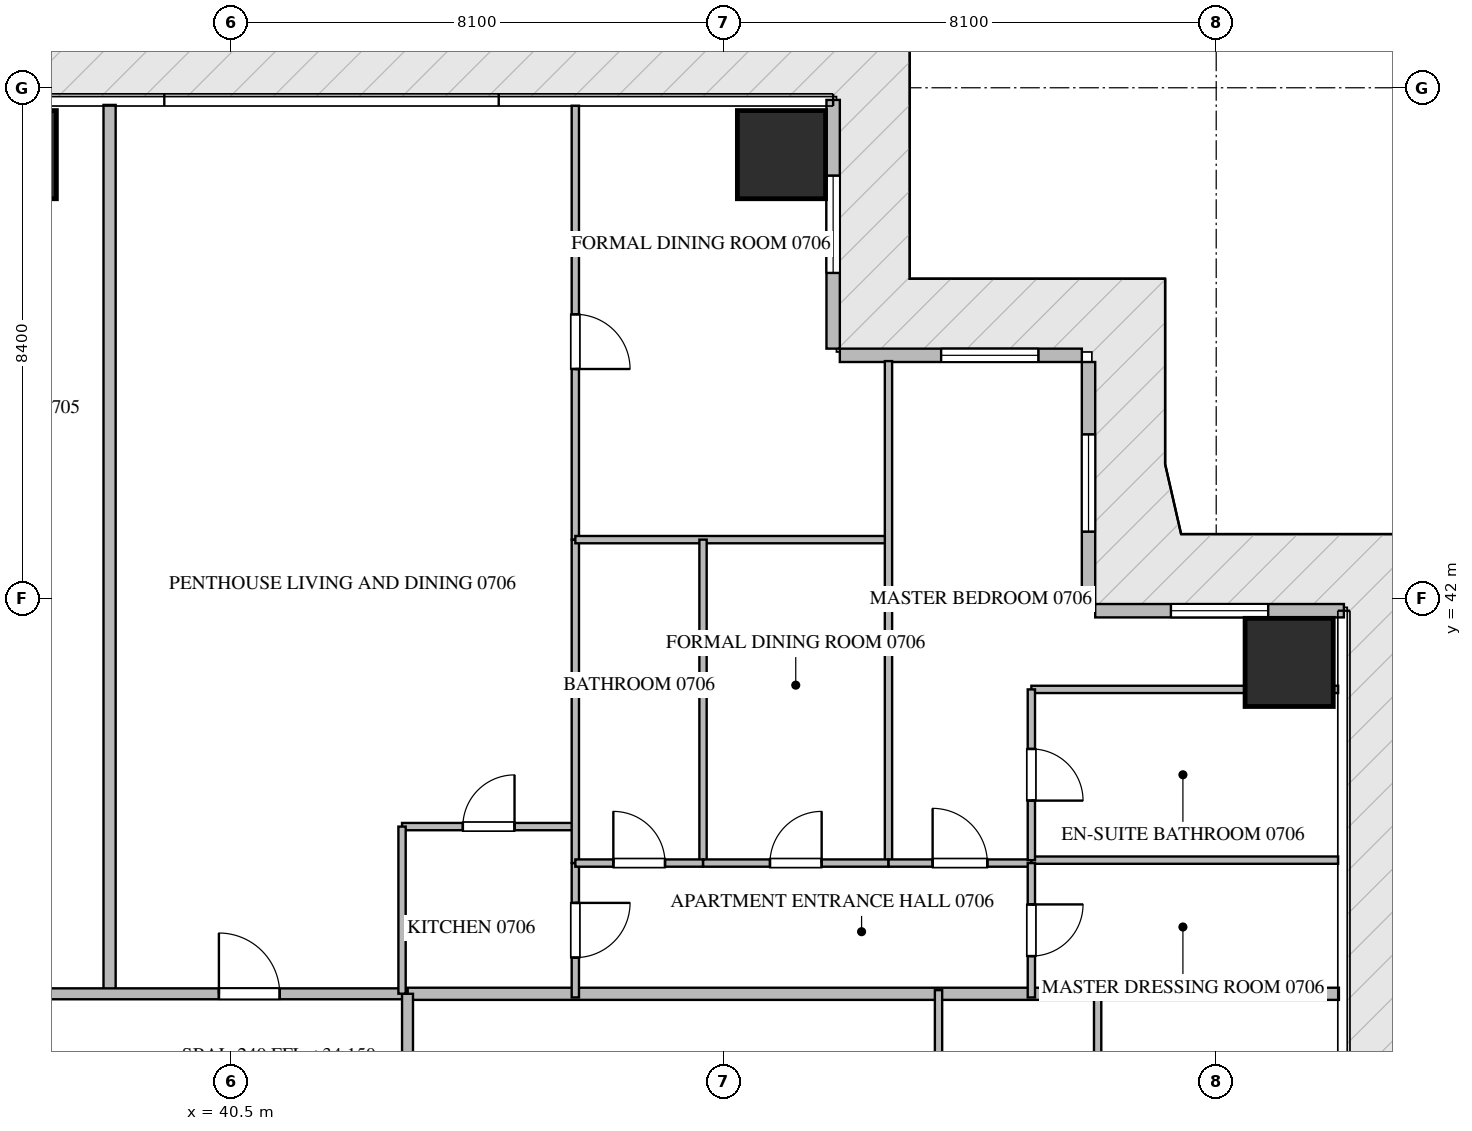
"""IFC4 building model, lengths in metres.
Left out: names, types, materials, properties, quantities, classifications, styles, units other than length and angle.
Written with IfcOpenShell. Run it as: python <this file> out.ifc"""

import sys

from ifc_helpers import new_model, si_unit, direction, frame, frame_2d, origin, origin_2d, place, context, subcontext, project, spatial, rectangle, extrude, source, transform, mapped, element, fill, save


model = new_model("IFC4")
c1 = context("Model", 3, precision=1e-05, world=origin(), true_north=direction((0.0, 1.0)))
c2 = subcontext(c1, "Body", "Model", "MODEL_VIEW")
j1 = project(units=[si_unit("LENGTHUNIT", "METRE"), si_unit("PLANEANGLEUNIT", "RADIAN")], contexts=[c1])
p1 = place(None, origin())
s1 = spatial("IfcSite", under=j1, at=p1, CompositionType="ELEMENT")
p2 = place(p1, origin())
s2 = spatial("IfcBuilding", under=s1, at=p2, CompositionType="ELEMENT")
p3 = place(p2, frame((0.0, 0.0, 34.2)))
s3 = spatial("IfcBuildingStorey", under=s2, at=p3, CompositionType="ELEMENT", Elevation=34.2)
m1 = source(origin(), c2, "Body", "SweptSolid", [
    extrude(rectangle(XDim=1.45, YDim=1.45, at=origin_2d()), origin(), (0.0, 0.0, 1.0), 3.75),
])
for number, where, z_axis, x_axis in (
    (1, (36.9, 49.3, -0.26), (0.0, 0.0, 1.0), (1.0, 0.0, 0.0)),
    (2, (49.55, 49.3, -0.26), (0.0, 0.0, 1.0), (1.0, 0.0, 0.0)),
    (3, (57.9, 40.95, -0.26), (0.0, 0.0, 1.0), (1.0, 0.0, 0.0)),
):
    element("IfcColumn", number, at=place(p3, frame(where, z_axis=z_axis, x_axis=x_axis)), inside=s3, PredefinedType="COLUMN", context=c2, shape_type="MappedRepresentation", body=[
        mapped(m1, transform((0.0, 0.0, 0.0), scale=1.0)),
    ])
p4 = place(p3, frame((58.8, 41.8, 0.0), z_axis=(0.0, 0.0, 1.0), x_axis=(-1.0, 0.0, 0.0)))
e4 = element("IfcWall", 4, at=p4, inside=s3, PredefinedType="ELEMENTEDWALL", context=c2, shape_type="SweptSolid", body=[
    extrude(rectangle(XDim=4.09, YDim=0.22, at=frame_2d((2.045, 0.0))), origin(), (0.0, 0.0, 1.0), 3.475),
])
p5 = place(p4, frame((1.245, 0.0, 0.65)))
e5 = element("IfcOpeningElement", 5, at=p5, cuts=e4, PredefinedType="OPENING", context=c2, shape_type="SweptSolid", body=[
    extrude(rectangle(XDim=1.6, YDim=2.1, at=frame_2d((0.8, 1.05))), frame((0.0, 0.12, 0.0), z_axis=(0.0, -1.0, 0.0), x_axis=(1.0, 0.0, 0.0)), (0.0, 0.0, 1.0), 0.24),
])
p6 = place(p3, frame((54.6, 41.91, 0.0), z_axis=(0.0, 0.0, 1.0), x_axis=(0.0, 1.0, 0.0)))
e6 = element("IfcWall", 6, at=p6, inside=s3, PredefinedType="ELEMENTEDWALL", context=c2, shape_type="SweptSolid", body=[
    extrude(rectangle(XDim=3.98, YDim=0.22, at=frame_2d((1.99, 0.0))), origin(), (0.0, 0.0, 1.0), 3.475),
])
p7 = place(p6, frame((1.19, 0.0, 0.65)))
e7 = element("IfcOpeningElement", 7, at=p7, cuts=e6, PredefinedType="OPENING", context=c2, shape_type="SweptSolid", body=[
    extrude(rectangle(XDim=1.6, YDim=2.1, at=frame_2d((0.8, 1.05))), frame((0.0, 0.12, 0.0), z_axis=(0.0, -1.0, 0.0), x_axis=(1.0, 0.0, 0.0)), (0.0, 0.0, 1.0), 0.24),
])
p8 = place(p3, frame((54.49, 46.0, 0.0), z_axis=(0.0, 0.0, 1.0), x_axis=(-1.0, 0.0, 0.0)))
e8 = element("IfcWall", 8, at=p8, inside=s3, PredefinedType="ELEMENTEDWALL", context=c2, shape_type="SweptSolid", body=[
    extrude(rectangle(XDim=3.98, YDim=0.22, at=frame_2d((1.99, 0.0))), origin(), (0.0, 0.0, 1.0), 3.475),
])
p9 = place(p8, frame((0.714, 0.0, 0.65)))
e9 = element("IfcOpeningElement", 9, at=p9, cuts=e8, PredefinedType="OPENING", context=c2, shape_type="SweptSolid", body=[
    extrude(rectangle(XDim=1.6, YDim=2.1, at=frame_2d((0.8, 1.05))), frame((0.0, 0.12, 0.0), z_axis=(0.0, -1.0, 0.0), x_axis=(1.0, 0.0, 0.0)), (0.0, 0.0, 1.0), 0.24),
])
p10 = place(p3, frame((50.4, 46.11, 0.0), z_axis=(0.0, 0.0, 1.0), x_axis=(0.0, 1.0, 0.0)))
e10 = element("IfcWall", 10, at=p10, inside=s3, PredefinedType="ELEMENTEDWALL", context=c2, shape_type="SweptSolid", body=[
    extrude(rectangle(XDim=4.09, YDim=0.22, at=frame_2d((2.045, 0.0))), origin(), (0.0, 0.0, 1.0), 3.475),
])
p11 = place(p10, frame((1.245, 0.0, 0.65)))
e11 = element("IfcOpeningElement", 11, at=p11, cuts=e10, PredefinedType="OPENING", context=c2, shape_type="SweptSolid", body=[
    extrude(rectangle(XDim=1.6, YDim=2.1, at=frame_2d((0.8, 1.05))), frame((0.0, 0.12, 0.0), z_axis=(0.0, -1.0, 0.0), x_axis=(1.0, 0.0, 0.0)), (0.0, 0.0, 1.0), 0.24),
])
p12 = place(p3, frame((38.5, 35.5, 0.0), z_axis=(0.0, 0.0, 1.0), x_axis=(0.0, 1.0, 0.0)))
e12 = element("IfcWall", 12, at=p12, inside=s3, PredefinedType="PARTITIONING", context=c2, shape_type="SweptSolid", body=[
    extrude(rectangle(XDim=14.618, YDim=0.2, at=frame_2d((7.309, 0.0))), origin(), (0.0, 0.0, 1.0), 3.49),
])
p13 = place(p3, frame((43.4, 35.5, 0.0), z_axis=(0.0, 0.0, 1.0), x_axis=(1.0, 0.0, 0.0)))
e13 = element("IfcWall", 13, at=p13, inside=s3, PredefinedType="PARTITIONING", context=c2, shape_type="SweptSolid", body=[
    extrude(rectangle(XDim=15.318, YDim=0.2, at=frame_2d((7.659, 0.0))), origin(), (0.0, 0.0, 1.0), 3.49),
])
p14 = place(p3, frame((21.402, 35.5, 0.0), z_axis=(0.0, 0.0, 1.0), x_axis=(1.0, 0.0, 0.0)))
e14 = element("IfcWall", 14, at=p14, inside=s3, PredefinedType="PARTITIONING", context=c2, shape_type="SweptSolid", body=[
    extrude(rectangle(XDim=21.996, YDim=0.18, at=frame_2d((10.998, 0.0))), origin(), (0.0, 0.0, 1.0), 3.49),
])
p15 = place(p14, frame((2.1, 0.0, 0.0)))
e15 = element("IfcOpeningElement", 15, at=p15, cuts=e14, PredefinedType="OPENING", context=c2, shape_type="SweptSolid", body=[
    extrude(rectangle(XDim=1.0, YDim=2.15, at=frame_2d((0.5, 1.075))), frame((0.0, 0.1, 0.0), z_axis=(0.0, -1.0, 0.0), x_axis=(1.0, 0.0, 0.0)), (0.0, 0.0, 1.0), 0.2),
])
p16 = place(p14, frame((14.277, 0.0, 0.0)))
e16 = element("IfcOpeningElement", 16, at=p16, cuts=e14, PredefinedType="OPENING", context=c2, shape_type="SweptSolid", body=[
    extrude(rectangle(XDim=1.0, YDim=2.15, at=frame_2d((0.5, 1.075))), frame((0.0, 0.1, 0.0), z_axis=(0.0, -1.0, 0.0), x_axis=(1.0, 0.0, 0.0)), (0.0, 0.0, 1.0), 0.2),
])
p17 = place(p14, frame((18.896, 0.0, 0.0)))
e17 = element("IfcOpeningElement", 17, at=p17, cuts=e14, PredefinedType="OPENING", context=c2, shape_type="SweptSolid", body=[
    extrude(rectangle(XDim=1.0, YDim=2.15, at=frame_2d((0.5, 1.075))), frame((0.0, 0.1, 0.0), z_axis=(0.0, -1.0, 0.0), x_axis=(1.0, 0.0, 0.0)), (0.0, 0.0, 1.0), 0.2),
])
p18 = place(p3, frame((43.4, 14.9, 0.0), z_axis=(0.0, 0.0, 1.0), x_axis=(0.0, 1.0, 0.0)))
e18 = element("IfcWall", 18, at=p18, inside=s3, PredefinedType="PARTITIONING", context=c2, shape_type="SweptSolid", body=[
    extrude(rectangle(XDim=20.6, YDim=0.18, at=frame_2d((10.3, 0.0))), origin(), (0.0, 0.0, 1.0), 3.49),
])
p19 = place(p18, frame((1.96, 0.0, 0.0)))
e19 = element("IfcOpeningElement", 19, at=p19, cuts=e18, PredefinedType="OPENING", context=c2, shape_type="SweptSolid", body=[
    extrude(rectangle(XDim=1.0, YDim=2.15, at=frame_2d((0.5, 1.075))), frame((0.0, 0.1, 0.0), z_axis=(0.0, -1.0, 0.0), x_axis=(1.0, 0.0, 0.0)), (0.0, 0.0, 1.0), 0.2),
])
p20 = place(p3, frame((43.31, 38.25, 0.0), z_axis=(0.0, 0.0, 1.0), x_axis=(1.0, 0.0, 0.0)))
e20 = element("IfcWall", 20, at=p20, inside=s3, PredefinedType="PARTITIONING", context=c2, shape_type="SweptSolid", body=[
    extrude(rectangle(XDim=2.85, YDim=0.12, at=frame_2d((1.425, 0.0))), origin(), (0.0, 0.0, 1.0), 3.49),
])
p21 = place(p20, frame((1.0, 0.0, 0.0)))
e21 = element("IfcOpeningElement", 21, at=p21, cuts=e20, PredefinedType="OPENING", context=c2, shape_type="SweptSolid", body=[
    extrude(rectangle(XDim=0.85, YDim=2.1, at=frame_2d((0.425, 1.05))), frame((0.0, 0.07, 0.0), z_axis=(0.0, -1.0, 0.0), x_axis=(1.0, 0.0, 0.0)), (0.0, 0.0, 1.0), 0.14),
])
p22 = place(p3, frame((43.31, 38.25, 0.0), z_axis=(0.0, 0.0, 1.0), x_axis=(0.0, -1.0, 0.0)))
e22 = element("IfcWall", 22, at=p22, inside=s3, PredefinedType="PARTITIONING", context=c2, shape_type="SweptSolid", body=[
    extrude(rectangle(XDim=2.748, YDim=0.12, at=frame_2d((1.374, 0.0))), origin(), (0.0, 0.0, 1.0), 3.49),
])
p23 = place(p3, frame((46.16, 37.65, 0.0), z_axis=(0.0, 0.0, 1.0), x_axis=(0.0, -1.0, 0.0)))
e23 = element("IfcWall", 23, at=p23, inside=s3, PredefinedType="PARTITIONING", context=c2, shape_type="SweptSolid", body=[
    extrude(rectangle(XDim=2.21, YDim=0.12, at=frame_2d((1.105, 0.0))), origin(), (0.0, 0.0, 1.0), 3.49),
])
p24 = place(p23, frame((0.655, 0.0, 0.0)))
e24 = element("IfcOpeningElement", 24, at=p24, cuts=e23, PredefinedType="OPENING", context=c2, shape_type="SweptSolid", body=[
    extrude(rectangle(XDim=0.9, YDim=2.1, at=frame_2d((0.45, 1.05))), frame((0.0, 0.07, 0.0), z_axis=(0.0, -1.0, 0.0), x_axis=(1.0, 0.0, 0.0)), (0.0, 0.0, 1.0), 0.14),
])
p25 = place(p3, frame((46.16, 50.105, 0.0), z_axis=(0.0, 0.0, 1.0), x_axis=(0.0, -1.0, 0.0)))
e25 = element("IfcWall", 25, at=p25, inside=s3, PredefinedType="PARTITIONING", context=c2, shape_type="SweptSolid", body=[
    extrude(rectangle(XDim=7.136, YDim=0.12, at=frame_2d((3.568, 0.0))), origin(), (0.0, 0.0, 1.0), 3.49),
])
p26 = place(p25, frame((3.43, 0.0, 0.0)))
e26 = element("IfcOpeningElement", 26, at=p26, cuts=e25, PredefinedType="OPENING", context=c2, shape_type="SweptSolid", body=[
    extrude(rectangle(XDim=0.9, YDim=2.1, at=frame_2d((0.45, 1.05))), frame((0.0, 0.07, 0.0), z_axis=(0.0, -1.0, 0.0), x_axis=(1.0, 0.0, 0.0)), (0.0, 0.0, 1.0), 0.14),
])
p27 = place(p3, frame((46.16, 42.967, 0.0), z_axis=(0.0, 0.0, 1.0), x_axis=(0.0, -1.0, 0.0)))
e27 = element("IfcWall", 27, at=p27, inside=s3, PredefinedType="PARTITIONING", context=c2, shape_type="SweptSolid", body=[
    extrude(rectangle(XDim=5.315, YDim=0.12, at=frame_2d((2.657, 0.0))), origin(), (0.0, 0.0, 1.0), 3.49),
])
p28 = place(p3, frame((46.16, 42.969, 0.0), z_axis=(0.0, 0.0, 1.0), x_axis=(1.0, 0.0, 0.0)))
e28 = element("IfcWall", 28, at=p28, inside=s3, PredefinedType="PARTITIONING", context=c2, shape_type="SweptSolid", body=[
    extrude(rectangle(XDim=5.15, YDim=0.12, at=frame_2d((2.575, 0.0))), origin(), (0.0, 0.0, 1.0), 3.49),
])
p29 = place(p3, frame((51.31, 45.905, 0.0), z_axis=(0.0, 0.0, 1.0), x_axis=(0.0, -1.0, 0.0)))
e29 = element("IfcWall", 29, at=p29, inside=s3, PredefinedType="PARTITIONING", context=c2, shape_type="SweptSolid", body=[
    extrude(rectangle(XDim=8.255, YDim=0.12, at=frame_2d((4.127, 0.0))), origin(), (0.0, 0.0, 1.0), 3.49),
])
p30 = place(p3, frame((48.26, 42.969, 0.0), z_axis=(0.0, 0.0, 1.0), x_axis=(0.0, -1.0, 0.0)))
e30 = element("IfcWall", 30, at=p30, inside=s3, PredefinedType="PARTITIONING", context=c2, shape_type="SweptSolid", body=[
    extrude(rectangle(XDim=5.319, YDim=0.12, at=frame_2d((2.66, 0.0))), origin(), (0.0, 0.0, 1.0), 3.49),
])
p31 = place(p3, frame((46.16, 37.65, 0.0), z_axis=(0.0, 0.0, 1.0), x_axis=(1.0, 0.0, 0.0)))
e31 = element("IfcWall", 31, at=p31, inside=s3, PredefinedType="PARTITIONING", context=c2, shape_type="SweptSolid", body=[
    extrude(rectangle(XDim=2.1, YDim=0.12, at=frame_2d((1.05, 0.0))), origin(), (0.0, 0.0, 1.0), 3.49),
])
p32 = place(p31, frame((0.625, 0.0, 0.0)))
e32 = element("IfcOpeningElement", 32, at=p32, cuts=e31, PredefinedType="OPENING", context=c2, shape_type="SweptSolid", body=[
    extrude(rectangle(XDim=0.85, YDim=2.1, at=frame_2d((0.425, 1.05))), frame((0.0, 0.07, 0.0), z_axis=(0.0, -1.0, 0.0), x_axis=(1.0, 0.0, 0.0)), (0.0, 0.0, 1.0), 0.14),
])
p33 = place(p3, frame((48.262, 37.65, 0.0), z_axis=(0.0, 0.0, 1.0), x_axis=(1.0, 0.0, 0.0)))
e33 = element("IfcWall", 33, at=p33, inside=s3, PredefinedType="PARTITIONING", context=c2, shape_type="SweptSolid", body=[
    extrude(rectangle(XDim=3.048, YDim=0.12, at=frame_2d((1.524, 0.0))), origin(), (0.0, 0.0, 1.0), 3.49),
])
p34 = place(p33, frame((1.099, 0.0, 0.0)))
e34 = element("IfcOpeningElement", 34, at=p34, cuts=e33, PredefinedType="OPENING", context=c2, shape_type="SweptSolid", body=[
    extrude(rectangle(XDim=0.85, YDim=2.1, at=frame_2d((0.425, 1.05))), frame((0.0, 0.07, 0.0), z_axis=(0.0, -1.0, 0.0), x_axis=(1.0, 0.0, 0.0)), (0.0, 0.0, 1.0), 0.14),
])
p35 = place(p3, frame((51.312, 37.65, 0.0), z_axis=(0.0, 0.0, 1.0), x_axis=(1.0, 0.0, 0.0)))
e35 = element("IfcWall", 35, at=p35, inside=s3, PredefinedType="PARTITIONING", context=c2, shape_type="SweptSolid", body=[
    extrude(rectangle(XDim=2.348, YDim=0.12, at=frame_2d((1.174, 0.0))), origin(), (0.0, 0.0, 1.0), 3.49),
])
p36 = place(p35, frame((0.724, 0.0, 0.0)))
e36 = element("IfcOpeningElement", 36, at=p36, cuts=e35, PredefinedType="OPENING", context=c2, shape_type="SweptSolid", body=[
    extrude(rectangle(XDim=0.9, YDim=2.1, at=frame_2d((0.45, 1.05))), frame((0.0, 0.07, 0.0), z_axis=(0.0, -1.0, 0.0), x_axis=(1.0, 0.0, 0.0)), (0.0, 0.0, 1.0), 0.14),
])
p37 = place(p3, frame((53.66, 40.506, 0.0), z_axis=(0.0, 0.0, 1.0), x_axis=(1.0, 0.0, 0.0)))
e37 = element("IfcWall", 37, at=p37, inside=s3, PredefinedType="PARTITIONING", context=c2, shape_type="SweptSolid", body=[
    extrude(rectangle(XDim=5.045, YDim=0.12, at=frame_2d((2.522, 0.0))), origin(), (0.0, 0.0, 1.0), 3.49),
])
p38 = place(p3, frame((53.662, 37.698, 0.0), z_axis=(0.0, 0.0, 1.0), x_axis=(1.0, 0.0, 0.0)))
e38 = element("IfcWall", 38, at=p38, inside=s3, PredefinedType="PARTITIONING", context=c2, shape_type="SweptSolid", body=[
    extrude(rectangle(XDim=5.043, YDim=0.12, at=frame_2d((2.521, 0.0))), origin(), (0.0, 0.0, 1.0), 3.49),
])
p39 = place(p3, frame((53.66, 40.506, 0.0), z_axis=(0.0, 0.0, 1.0), x_axis=(0.0, -1.0, 0.0)))
e39 = element("IfcWall", 39, at=p39, inside=s3, PredefinedType="PARTITIONING", context=c2, shape_type="SweptSolid", body=[
    extrude(rectangle(XDim=2.808, YDim=0.12, at=frame_2d((1.404, 0.0))), origin(), (0.0, 0.0, 1.0), 3.49),
])
p40 = place(p39, frame((0.979, 0.0, 0.0)))
e40 = element("IfcOpeningElement", 40, at=p40, cuts=e39, PredefinedType="OPENING", context=c2, shape_type="SweptSolid", body=[
    extrude(rectangle(XDim=0.85, YDim=2.1, at=frame_2d((0.425, 1.05))), frame((0.0, 0.07, 0.0), z_axis=(0.0, -1.0, 0.0), x_axis=(1.0, 0.0, 0.0)), (0.0, 0.0, 1.0), 0.14),
])
p41 = place(p3, frame((53.66, 37.65, 0.0), z_axis=(0.0, 0.0, 1.0), x_axis=(0.0, -1.0, 0.0)))
e41 = element("IfcWall", 41, at=p41, inside=s3, PredefinedType="PARTITIONING", context=c2, shape_type="SweptSolid", body=[
    extrude(rectangle(XDim=2.21, YDim=0.12, at=frame_2d((1.105, 0.0))), origin(), (0.0, 0.0, 1.0), 3.49),
])
p42 = place(p41, frame((0.68, 0.0, 0.0)))
e42 = element("IfcOpeningElement", 42, at=p42, cuts=e41, PredefinedType="OPENING", context=c2, shape_type="SweptSolid", body=[
    extrude(rectangle(XDim=0.85, YDim=2.1, at=frame_2d((0.425, 1.05))), frame((0.0, 0.07, 0.0), z_axis=(0.0, -1.0, 0.0), x_axis=(1.0, 0.0, 0.0)), (0.0, 0.0, 1.0), 0.14),
])
for number, where, z_axis, x_axis in (
    (43, (54.75, 30.15, 0.0), (0.0, 0.0, 1.0), (0.0, 1.0, 0.0)),
    (44, (52.133, 30.15, 0.0), (0.0, 0.0, 1.0), (0.0, 1.0, 0.0)),
):
    element("IfcWall", number, at=place(p3, frame(where, z_axis=z_axis, x_axis=x_axis)), inside=s3, PredefinedType="PARTITIONING", context=c2, shape_type="SweptSolid", body=[
        extrude(rectangle(XDim=5.41, YDim=0.12, at=frame_2d((2.705, 0.0))), origin(), (0.0, 0.0, 1.0), 3.49),
    ])
m2 = source(origin(), c2, "Body", "SweptSolid", [
    extrude(rectangle(XDim=1.6, YDim=2.1, at=frame_2d((0.8, 1.05))), frame((0.0, 0.03, 0.0), z_axis=(0.0, -1.0, 0.0), x_axis=(1.0, 0.0, 0.0)), (0.0, 0.0, 1.0), 0.06),
])
p43 = place(p5, origin())
e45 = element("IfcWindow", 45, at=p43, inside=s3, PartitioningType="SINGLE_PANEL", PredefinedType="WINDOW", context=c2, shape_type="MappedRepresentation", body=[
    mapped(m2, transform((0.0, 0.0, 0.0), scale=1.0)),
])
fill(e5, e45)
p44 = place(p7, origin())
e46 = element("IfcWindow", 46, at=p44, inside=s3, PartitioningType="SINGLE_PANEL", PredefinedType="WINDOW", context=c2, shape_type="MappedRepresentation", body=[
    mapped(m2, transform((0.0, 0.0, 0.0), scale=1.0)),
])
fill(e7, e46)
p45 = place(p9, origin())
e47 = element("IfcWindow", 47, at=p45, inside=s3, PartitioningType="SINGLE_PANEL", PredefinedType="WINDOW", context=c2, shape_type="MappedRepresentation", body=[
    mapped(m2, transform((0.0, 0.0, 0.0), scale=1.0)),
])
fill(e9, e47)
p46 = place(p11, origin())
e48 = element("IfcWindow", 48, at=p46, inside=s3, PartitioningType="SINGLE_PANEL", PredefinedType="WINDOW", context=c2, shape_type="MappedRepresentation", body=[
    mapped(m2, transform((0.0, 0.0, 0.0), scale=1.0)),
])
fill(e11, e48)
m3 = source(origin(), c2, "Body", "SweptSolid", [
    extrude(rectangle(XDim=1.0, YDim=2.15, at=frame_2d((0.5, 1.075))), frame((0.0, 0.025, 0.0), z_axis=(0.0, -1.0, 0.0), x_axis=(1.0, 0.0, 0.0)), (0.0, 0.0, 1.0), 0.05),
])
p47 = place(p17, origin())
e49 = element("IfcDoor", 49, at=p47, inside=s3, OperationType="SINGLE_SWING_LEFT", PredefinedType="DOOR", context=c2, shape_type="MappedRepresentation", body=[
    mapped(m3, transform((0.0, 0.0, 0.0), scale=1.0)),
])
fill(e17, e49)
m4 = source(origin(), c2, "Body", "SweptSolid", [
    extrude(rectangle(XDim=0.85, YDim=2.1, at=frame_2d((0.425, 1.05))), frame((0.0, 0.025, 0.0), z_axis=(0.0, -1.0, 0.0), x_axis=(1.0, 0.0, 0.0)), (0.0, 0.0, 1.0), 0.05),
])
p48 = place(p21, origin())
e50 = element("IfcDoor", 50, at=p48, inside=s3, OperationType="SINGLE_SWING_RIGHT", PredefinedType="DOOR", context=c2, shape_type="MappedRepresentation", body=[
    mapped(m4, transform((0.0, 0.0, 0.0), scale=1.0)),
])
fill(e21, e50)
m5 = source(origin(), c2, "Body", "SweptSolid", [
    extrude(rectangle(XDim=0.9, YDim=2.1, at=frame_2d((0.45, 1.05))), frame((0.0, 0.025, 0.0), z_axis=(0.0, -1.0, 0.0), x_axis=(1.0, 0.0, 0.0)), (0.0, 0.0, 1.0), 0.05),
])
p49 = place(p24, origin())
e51 = element("IfcDoor", 51, at=p49, inside=s3, OperationType="SINGLE_SWING_LEFT", PredefinedType="DOOR", context=c2, shape_type="MappedRepresentation", body=[
    mapped(m5, transform((0.0, 0.0, 0.0), scale=1.0)),
])
fill(e24, e51)
p50 = place(p26, origin())
e52 = element("IfcDoor", 52, at=p50, inside=s3, OperationType="SINGLE_SWING_RIGHT", PredefinedType="DOOR", context=c2, shape_type="MappedRepresentation", body=[
    mapped(m5, transform((0.0, 0.0, 0.0), scale=1.0)),
])
fill(e26, e52)
p51 = place(p32, origin())
e53 = element("IfcDoor", 53, at=p51, inside=s3, OperationType="SINGLE_SWING_LEFT", PredefinedType="DOOR", context=c2, shape_type="MappedRepresentation", body=[
    mapped(m4, transform((0.0, 0.0, 0.0), scale=1.0)),
])
fill(e32, e53)
p52 = place(p34, origin())
e54 = element("IfcDoor", 54, at=p52, inside=s3, OperationType="SINGLE_SWING_RIGHT", PredefinedType="DOOR", context=c2, shape_type="MappedRepresentation", body=[
    mapped(m4, transform((0.0, 0.0, 0.0), scale=1.0)),
])
fill(e34, e54)
p53 = place(p36, origin())
e55 = element("IfcDoor", 55, at=p53, inside=s3, OperationType="SINGLE_SWING_LEFT", PredefinedType="DOOR", context=c2, shape_type="MappedRepresentation", body=[
    mapped(m5, transform((0.0, 0.0, 0.0), scale=1.0)),
])
fill(e36, e55)
p54 = place(p40, origin())
e56 = element("IfcDoor", 56, at=p54, inside=s3, OperationType="SINGLE_SWING_RIGHT", PredefinedType="DOOR", context=c2, shape_type="MappedRepresentation", body=[
    mapped(m4, transform((0.0, 0.0, 0.0), scale=1.0)),
])
fill(e40, e56)
p55 = place(p42, origin())
e57 = element("IfcDoor", 57, at=p55, inside=s3, OperationType="SINGLE_SWING_LEFT", PredefinedType="DOOR", context=c2, shape_type="MappedRepresentation", body=[
    mapped(m4, transform((0.0, 0.0, 0.0), scale=1.0)),
])
fill(e42, e57)
save(model, sys.argv[1])
